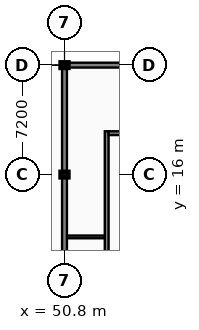
"""IFC4 building model, lengths in metres.
Left out: names, types, materials, properties, quantities, classifications, styles, units other than length and angle.
Written with IfcOpenShell. Run it as: python <this file> out.ifc"""

import sys

from ifc_helpers import new_model, si_unit, direction, frame, frame_2d, origin, origin_2d, place, context, subcontext, project, spatial, rectangle, extrude, element, fill, save


model = new_model("IFC4")
c1 = context("Model", 3, precision=1e-05, world=origin(), true_north=direction((0.0, 1.0)))
c2 = subcontext(c1, "Body", "Model", "MODEL_VIEW")
j1 = project(units=[si_unit("LENGTHUNIT", "METRE"), si_unit("PLANEANGLEUNIT", "RADIAN")], contexts=[c1])
p1 = place(None, origin())
s1 = spatial("IfcSite", under=j1, at=p1, CompositionType="ELEMENT")
p2 = place(p1, origin())
s2 = spatial("IfcBuilding", under=s1, at=p2, CompositionType="ELEMENT")
p3 = place(p2, origin())
s3 = spatial("IfcBuildingStorey", under=s2, at=p3, CompositionType="ELEMENT", Elevation=0.0)
for number, where, z_axis, x_axis in (
    (1, (50.8, 16.0, 0.0), (0.0, 0.0, 1.0), (1.0, 0.0, 0.0)),
    (2, (50.8, 23.2, 0.0), (0.0, 0.0, 1.0), (1.0, 0.0, 0.0)),
):
    element("IfcColumn", number, at=place(p3, frame(where, z_axis=z_axis, x_axis=x_axis)), inside=s3, PredefinedType="PILASTER", context=c2, shape_type="SweptSolid", body=[
        extrude(rectangle(XDim=0.5, YDim=0.35, at=origin_2d()), origin(), (0.0, 0.0, 1.0), 5.4),
    ])
p4 = place(p3, frame((50.95, 11.9, 0.0), z_axis=(0.0, 0.0, 1.0), x_axis=(1.0, 0.0, 0.0)))
e3 = element("IfcWall", 3, at=p4, inside=s3, PredefinedType="PARTITIONING", context=c2, shape_type="SweptSolid", body=[
    extrude(rectangle(XDim=2.65, YDim=0.18, at=frame_2d((1.325, 0.0))), origin(), (0.0, 0.0, 1.0), 4.39),
])
p5 = place(p4, frame((0.825, 0.0, -0.01)))
e4 = element("IfcOpeningElement", 4, at=p5, cuts=e3, PredefinedType="OPENING", context=c2, shape_type="SweptSolid", body=[
    extrude(rectangle(XDim=1.0, YDim=2.16, at=frame_2d((0.5, 1.08))), frame((0.0, 0.1, 0.0), z_axis=(0.0, -1.0, 0.0), x_axis=(1.0, 0.0, 0.0)), (0.0, 0.0, 1.0), 0.2),
])
p6 = place(p3, frame((58.0, 23.2, 0.0), z_axis=(0.0, 0.0, 1.0), x_axis=(-1.0, 0.0, 0.0)))
e5 = element("IfcWall", 5, at=p6, inside=s3, PredefinedType="SOLIDWALL", context=c2, shape_type="SweptSolid", body=[
    extrude(rectangle(XDim=7.2, YDim=0.32, at=frame_2d((3.6, 0.0))), origin(), (0.0, 0.0, 1.0), 3.99),
])
p7 = place(p6, frame((0.46, 0.0, 0.9)))
e6 = element("IfcOpeningElement", 6, at=p7, cuts=e5, PredefinedType="OPENING", context=c2, shape_type="SweptSolid", body=[
    extrude(rectangle(XDim=1.8, YDim=2.2, at=frame_2d((0.9, 1.1))), frame((0.0, 0.17, 0.0), z_axis=(0.0, -1.0, 0.0), x_axis=(1.0, 0.0, 0.0)), (0.0, 0.0, 1.0), 0.34),
])
p8 = place(p6, frame((4.86, 0.0, 0.9)))
e7 = element("IfcOpeningElement", 7, at=p8, cuts=e5, PredefinedType="OPENING", context=c2, shape_type="SweptSolid", body=[
    extrude(rectangle(XDim=1.8, YDim=2.2, at=frame_2d((0.9, 1.1))), frame((0.0, 0.17, 0.0), z_axis=(0.0, -1.0, 0.0), x_axis=(1.0, 0.0, 0.0)), (0.0, 0.0, 1.0), 0.34),
])
p9 = place(p3, frame((50.8, 16.0, 0.0), z_axis=(0.0, 0.0, 1.0), x_axis=(0.0, -1.0, 0.0)))
e8 = element("IfcWall", 8, at=p9, inside=s3, PredefinedType="SOLIDWALL", context=c2, shape_type="SweptSolid", body=[
    extrude(rectangle(XDim=7.2, YDim=0.32, at=frame_2d((3.6, 0.0))), origin(), (0.0, 0.0, 1.0), 3.99),
])
p10 = place(p9, frame((0.46, 0.0, 0.9)))
e9 = element("IfcOpeningElement", 9, at=p10, cuts=e8, PredefinedType="OPENING", context=c2, shape_type="SweptSolid", body=[
    extrude(rectangle(XDim=1.8, YDim=2.2, at=frame_2d((0.9, 1.1))), frame((0.0, 0.17, 0.0), z_axis=(0.0, -1.0, 0.0), x_axis=(1.0, 0.0, 0.0)), (0.0, 0.0, 1.0), 0.34),
])
p11 = place(p9, frame((4.86, 0.0, 0.9)))
e10 = element("IfcOpeningElement", 10, at=p11, cuts=e8, PredefinedType="OPENING", context=c2, shape_type="SweptSolid", body=[
    extrude(rectangle(XDim=1.8, YDim=2.2, at=frame_2d((0.9, 1.1))), frame((0.0, 0.17, 0.0), z_axis=(0.0, -1.0, 0.0), x_axis=(1.0, 0.0, 0.0)), (0.0, 0.0, 1.0), 0.34),
])
p12 = place(p3, frame((50.8, 23.2, 0.0), z_axis=(0.0, 0.0, 1.0), x_axis=(0.0, -1.0, 0.0)))
e11 = element("IfcWall", 11, at=p12, inside=s3, PredefinedType="SOLIDWALL", context=c2, shape_type="SweptSolid", body=[
    extrude(rectangle(XDim=7.2, YDim=0.32, at=frame_2d((3.6, 0.0))), origin(), (0.0, 0.0, 1.0), 3.99),
])
p13 = place(p12, frame((0.46, 0.0, 0.9)))
e12 = element("IfcOpeningElement", 12, at=p13, cuts=e11, PredefinedType="OPENING", context=c2, shape_type="SweptSolid", body=[
    extrude(rectangle(XDim=1.8, YDim=2.2, at=frame_2d((0.9, 1.1))), frame((0.0, 0.17, 0.0), z_axis=(0.0, -1.0, 0.0), x_axis=(1.0, 0.0, 0.0)), (0.0, 0.0, 1.0), 0.34),
])
p14 = place(p12, frame((4.86, 0.0, 0.9)))
e13 = element("IfcOpeningElement", 13, at=p14, cuts=e11, PredefinedType="OPENING", context=c2, shape_type="SweptSolid", body=[
    extrude(rectangle(XDim=1.8, YDim=2.2, at=frame_2d((0.9, 1.1))), frame((0.0, 0.17, 0.0), z_axis=(0.0, -1.0, 0.0), x_axis=(1.0, 0.0, 0.0)), (0.0, 0.0, 1.0), 0.34),
])
p15 = place(p3, frame((53.575, 9.95, 0.0), z_axis=(0.0, 0.0, 1.0), x_axis=(0.0, 1.0, 0.0)))
e14 = element("IfcWall", 14, at=p15, inside=s3, PredefinedType="SHEAR", context=c2, shape_type="SweptSolid", body=[
    extrude(rectangle(XDim=8.9, YDim=0.25, at=frame_2d((4.45, 0.0))), origin(), (0.0, 0.0, 1.0), 5.4),
])
p16 = place(p3, frame((57.2, 18.725, 0.0), z_axis=(0.0, 0.0, 1.0), x_axis=(-1.0, 0.0, 0.0)))
e15 = element("IfcWall", 15, at=p16, inside=s3, PredefinedType="SHEAR", context=c2, shape_type="SweptSolid", body=[
    extrude(rectangle(XDim=3.5, YDim=0.25, at=frame_2d((1.75, 0.0))), origin(), (0.0, 0.0, 1.0), 5.4),
])
p17 = place(p5, frame((1.0, 0.0, 0.01), z_axis=(0.0, 0.0, 1.0), x_axis=(-1.0, 0.0, 0.0)))
e16 = element("IfcDoor", 16, at=p17, inside=s3, OperationType="SINGLE_SWING_RIGHT", PredefinedType="DOOR", context=c2, shape_type="SweptSolid", body=[
    extrude(rectangle(XDim=1.0, YDim=2.15, at=frame_2d((0.5, 1.075))), frame((0.0, 0.025, 0.0), z_axis=(0.0, -1.0, 0.0), x_axis=(1.0, 0.0, 0.0)), (0.0, 0.0, 1.0), 0.05),
])
fill(e4, e16)
p18 = place(p8, origin())
e17 = element("IfcWindow", 17, at=p18, inside=s3, PartitioningType="DOUBLE_PANEL_VERTICAL", PredefinedType="WINDOW", context=c2, shape_type="SweptSolid", body=[
    extrude(rectangle(XDim=1.8, YDim=2.2, at=frame_2d((0.9, 1.1))), frame((0.0, 0.03, 0.0), z_axis=(0.0, -1.0, 0.0), x_axis=(1.0, 0.0, 0.0)), (0.0, 0.0, 1.0), 0.06),
])
fill(e7, e17)
p19 = place(p10, origin())
e18 = element("IfcWindow", 18, at=p19, inside=s3, PartitioningType="DOUBLE_PANEL_VERTICAL", PredefinedType="WINDOW", context=c2, shape_type="SweptSolid", body=[
    extrude(rectangle(XDim=1.8, YDim=2.2, at=frame_2d((0.9, 1.1))), frame((0.0, 0.03, 0.0), z_axis=(0.0, -1.0, 0.0), x_axis=(1.0, 0.0, 0.0)), (0.0, 0.0, 1.0), 0.06),
])
fill(e9, e18)
p20 = place(p11, origin())
e19 = element("IfcWindow", 19, at=p20, inside=s3, PartitioningType="DOUBLE_PANEL_VERTICAL", PredefinedType="WINDOW", context=c2, shape_type="SweptSolid", body=[
    extrude(rectangle(XDim=1.8, YDim=2.2, at=frame_2d((0.9, 1.1))), frame((0.0, 0.03, 0.0), z_axis=(0.0, -1.0, 0.0), x_axis=(1.0, 0.0, 0.0)), (0.0, 0.0, 1.0), 0.06),
])
fill(e10, e19)
p21 = place(p13, origin())
e20 = element("IfcWindow", 20, at=p21, inside=s3, PartitioningType="DOUBLE_PANEL_VERTICAL", PredefinedType="WINDOW", context=c2, shape_type="SweptSolid", body=[
    extrude(rectangle(XDim=1.8, YDim=2.2, at=frame_2d((0.9, 1.1))), frame((0.0, 0.03, 0.0), z_axis=(0.0, -1.0, 0.0), x_axis=(1.0, 0.0, 0.0)), (0.0, 0.0, 1.0), 0.06),
])
fill(e12, e20)
p22 = place(p14, origin())
e21 = element("IfcWindow", 21, at=p22, inside=s3, PartitioningType="DOUBLE_PANEL_VERTICAL", PredefinedType="WINDOW", context=c2, shape_type="SweptSolid", body=[
    extrude(rectangle(XDim=1.8, YDim=2.2, at=frame_2d((0.9, 1.1))), frame((0.0, 0.03, 0.0), z_axis=(0.0, -1.0, 0.0), x_axis=(1.0, 0.0, 0.0)), (0.0, 0.0, 1.0), 0.06),
])
fill(e13, e21)
save(model, sys.argv[1])
